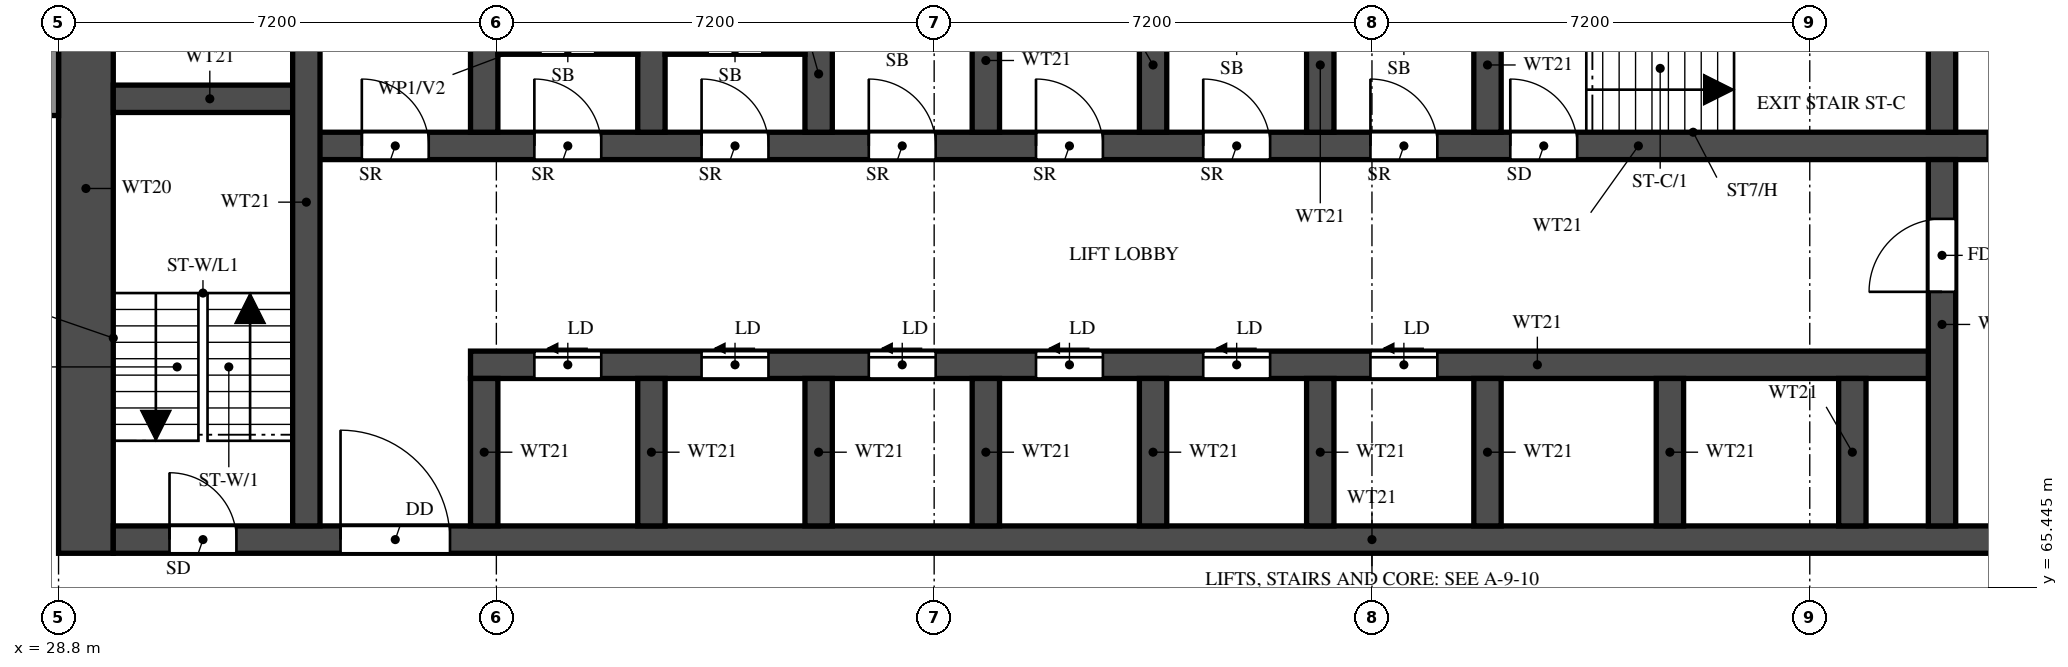
"""IFC4 building model, lengths in metres.
Left out: names, types, materials, properties, quantities, classifications, styles, units other than length and angle.
Written with IfcOpenShell. Run it as: python <this file> out.ifc"""

import sys

from ifc_helpers import new_model, si_unit, direction, frame, frame_2d, origin, place, context, subcontext, project, spatial, rectangle, extrude, element, fill, save


model = new_model("IFC4")
c1 = context("Model", 3, precision=1e-05, world=origin(), true_north=direction((0.0, 1.0)))
c2 = subcontext(c1, "Body", "Model", "MODEL_VIEW")
j1 = project(units=[si_unit("LENGTHUNIT", "METRE"), si_unit("PLANEANGLEUNIT", "RADIAN")], contexts=[c1])
p1 = place(None, origin())
s1 = spatial("IfcSite", under=j1, at=p1, CompositionType="ELEMENT")
p2 = place(p1, origin())
s2 = spatial("IfcBuilding", under=s1, at=p2, CompositionType="ELEMENT")
p3 = place(p2, frame((0.0, 0.0, 55.0)))
s3 = spatial("IfcBuildingStorey", under=s2, at=p3, CompositionType="ELEMENT", Elevation=55.0)
p4 = place(p3, frame((29.25, 66.0, 0.0), z_axis=(0.0, 0.0, 1.0), x_axis=(0.0, 1.0, 0.0)))
e1 = element("IfcWall", 1, at=p4, inside=s3, PredefinedType="SHEAR", context=c2, shape_type="SweptSolid", body=[
    extrude(rectangle(XDim=12.0, YDim=0.9, at=frame_2d((6.0, 0.0))), origin(), (0.0, 0.0, 1.0), 3.18),
])
p5 = place(p3, frame((29.7, 66.225, 0.0), z_axis=(0.0, 0.0, 1.0), x_axis=(1.0, 0.0, 0.0)))
e2 = element("IfcWall", 2, at=p5, inside=s3, PredefinedType="SHEAR", context=c2, shape_type="SweptSolid", body=[
    extrude(rectangle(XDim=41.4, YDim=0.45, at=frame_2d((20.7, 0.0))), origin(), (0.0, 0.0, 1.0), 3.18),
])
p6 = place(p5, frame((0.925, 0.0, 0.0)))
e3 = element("IfcOpeningElement", 3, at=p6, cuts=e2, PredefinedType="OPENING", context=c2, shape_type="SweptSolid", body=[
    extrude(rectangle(XDim=1.1, YDim=2.1, at=frame_2d((0.55, 1.05))), frame((0.0, 0.235, 0.0), z_axis=(0.0, -1.0, 0.0), x_axis=(1.0, 0.0, 0.0)), (0.0, 0.0, 1.0), 0.47),
])
p7 = place(p5, frame((3.738, 0.0, 0.0)))
e4 = element("IfcOpeningElement", 4, at=p7, cuts=e2, PredefinedType="OPENING", context=c2, shape_type="SweptSolid", body=[
    extrude(rectangle(XDim=1.8, YDim=2.1, at=frame_2d((0.9, 1.05))), frame((0.0, 0.235, 0.0), z_axis=(0.0, -1.0, 0.0), x_axis=(1.0, 0.0, 0.0)), (0.0, 0.0, 1.0), 0.47),
])
p8 = place(p3, frame((35.575, 69.1, 0.0), z_axis=(0.0, 0.0, 1.0), x_axis=(1.0, 0.0, 0.0)))
e5 = element("IfcWall", 5, at=p8, inside=s3, PredefinedType="SHEAR", context=c2, shape_type="SweptSolid", body=[
    extrude(rectangle(XDim=24.2, YDim=0.45, at=frame_2d((12.1, 0.0))), origin(), (0.0, 0.0, 1.0), 3.18),
])
p9 = place(p8, frame((1.05, 0.0, 0.0)))
e6 = element("IfcOpeningElement", 6, at=p9, cuts=e5, PredefinedType="OPENING", context=c2, shape_type="SweptSolid", body=[
    extrude(rectangle(XDim=1.1, YDim=2.1, at=frame_2d((0.55, 1.05))), frame((0.0, 0.235, 0.0), z_axis=(0.0, -1.0, 0.0), x_axis=(1.0, 0.0, 0.0)), (0.0, 0.0, 1.0), 0.47),
])
p10 = place(p8, frame((3.8, 0.0, 0.0)))
e7 = element("IfcOpeningElement", 7, at=p10, cuts=e5, PredefinedType="OPENING", context=c2, shape_type="SweptSolid", body=[
    extrude(rectangle(XDim=1.1, YDim=2.1, at=frame_2d((0.55, 1.05))), frame((0.0, 0.235, 0.0), z_axis=(0.0, -1.0, 0.0), x_axis=(1.0, 0.0, 0.0)), (0.0, 0.0, 1.0), 0.47),
])
p11 = place(p8, frame((6.55, 0.0, 0.0)))
e8 = element("IfcOpeningElement", 8, at=p11, cuts=e5, PredefinedType="OPENING", context=c2, shape_type="SweptSolid", body=[
    extrude(rectangle(XDim=1.1, YDim=2.1, at=frame_2d((0.55, 1.05))), frame((0.0, 0.235, 0.0), z_axis=(0.0, -1.0, 0.0), x_axis=(1.0, 0.0, 0.0)), (0.0, 0.0, 1.0), 0.47),
])
p12 = place(p8, frame((9.3, 0.0, 0.0)))
e9 = element("IfcOpeningElement", 9, at=p12, cuts=e5, PredefinedType="OPENING", context=c2, shape_type="SweptSolid", body=[
    extrude(rectangle(XDim=1.1, YDim=2.1, at=frame_2d((0.55, 1.05))), frame((0.0, 0.235, 0.0), z_axis=(0.0, -1.0, 0.0), x_axis=(1.0, 0.0, 0.0)), (0.0, 0.0, 1.0), 0.47),
])
p13 = place(p8, frame((12.05, 0.0, 0.0)))
e10 = element("IfcOpeningElement", 10, at=p13, cuts=e5, PredefinedType="OPENING", context=c2, shape_type="SweptSolid", body=[
    extrude(rectangle(XDim=1.1, YDim=2.1, at=frame_2d((0.55, 1.05))), frame((0.0, 0.235, 0.0), z_axis=(0.0, -1.0, 0.0), x_axis=(1.0, 0.0, 0.0)), (0.0, 0.0, 1.0), 0.47),
])
p14 = place(p8, frame((14.8, 0.0, 0.0)))
e11 = element("IfcOpeningElement", 11, at=p14, cuts=e5, PredefinedType="OPENING", context=c2, shape_type="SweptSolid", body=[
    extrude(rectangle(XDim=1.1, YDim=2.1, at=frame_2d((0.55, 1.05))), frame((0.0, 0.235, 0.0), z_axis=(0.0, -1.0, 0.0), x_axis=(1.0, 0.0, 0.0)), (0.0, 0.0, 1.0), 0.47),
])
p15 = place(p3, frame((32.875, 72.7, 0.0), z_axis=(0.0, 0.0, 1.0), x_axis=(1.0, 0.0, 0.0)))
e12 = element("IfcWall", 12, at=p15, inside=s3, PredefinedType="SHEAR", context=c2, shape_type="SweptSolid", body=[
    extrude(rectangle(XDim=35.05, YDim=0.45, at=frame_2d((17.525, 0.0))), origin(), (0.0, 0.0, 1.0), 3.18),
])
p16 = place(p15, frame((19.8, 0.0, 0.0)))
e13 = element("IfcOpeningElement", 13, at=p16, cuts=e12, PredefinedType="OPENING", context=c2, shape_type="SweptSolid", body=[
    extrude(rectangle(XDim=1.1, YDim=2.1, at=frame_2d((0.55, 1.05))), frame((0.0, 0.235, 0.0), z_axis=(0.0, -1.0, 0.0), x_axis=(1.0, 0.0, 0.0)), (0.0, 0.0, 1.0), 0.47),
])
p17 = place(p15, frame((27.65, 0.0, 0.0)))
e14 = element("IfcOpeningElement", 14, at=p17, cuts=e12, PredefinedType="OPENING", context=c2, shape_type="SweptSolid", body=[
    extrude(rectangle(XDim=1.1, YDim=2.1, at=frame_2d((0.55, 1.05))), frame((0.0, 0.235, 0.0), z_axis=(0.0, -1.0, 0.0), x_axis=(1.0, 0.0, 0.0)), (0.0, 0.0, 1.0), 0.47),
])
p18 = place(p15, frame((30.25, 0.0, 0.0)))
e15 = element("IfcOpeningElement", 15, at=p18, cuts=e12, PredefinedType="OPENING", context=c2, shape_type="SweptSolid", body=[
    extrude(rectangle(XDim=1.1, YDim=2.1, at=frame_2d((0.55, 1.05))), frame((0.0, 0.235, 0.0), z_axis=(0.0, -1.0, 0.0), x_axis=(1.0, 0.0, 0.0)), (0.0, 0.0, 1.0), 0.47),
])
p19 = place(p15, frame((3.75, 0.0, 0.0)))
e16 = element("IfcOpeningElement", 16, at=p19, cuts=e12, PredefinedType="OPENING", context=c2, shape_type="SweptSolid", body=[
    extrude(rectangle(XDim=1.1, YDim=2.1, at=frame_2d((0.55, 1.05))), frame((0.0, 0.235, 0.0), z_axis=(0.0, -1.0, 0.0), x_axis=(1.0, 0.0, 0.0)), (0.0, 0.0, 1.0), 0.47),
])
p20 = place(p15, frame((6.5, 0.0, 0.0)))
e17 = element("IfcOpeningElement", 17, at=p20, cuts=e12, PredefinedType="OPENING", context=c2, shape_type="SweptSolid", body=[
    extrude(rectangle(XDim=1.1, YDim=2.1, at=frame_2d((0.55, 1.05))), frame((0.0, 0.235, 0.0), z_axis=(0.0, -1.0, 0.0), x_axis=(1.0, 0.0, 0.0)), (0.0, 0.0, 1.0), 0.47),
])
p21 = place(p15, frame((9.25, 0.0, 0.0)))
e18 = element("IfcOpeningElement", 18, at=p21, cuts=e12, PredefinedType="OPENING", context=c2, shape_type="SweptSolid", body=[
    extrude(rectangle(XDim=1.1, YDim=2.1, at=frame_2d((0.55, 1.05))), frame((0.0, 0.235, 0.0), z_axis=(0.0, -1.0, 0.0), x_axis=(1.0, 0.0, 0.0)), (0.0, 0.0, 1.0), 0.47),
])
p22 = place(p15, frame((12.0, 0.0, 0.0)))
e19 = element("IfcOpeningElement", 19, at=p22, cuts=e12, PredefinedType="OPENING", context=c2, shape_type="SweptSolid", body=[
    extrude(rectangle(XDim=1.1, YDim=2.1, at=frame_2d((0.55, 1.05))), frame((0.0, 0.235, 0.0), z_axis=(0.0, -1.0, 0.0), x_axis=(1.0, 0.0, 0.0)), (0.0, 0.0, 1.0), 0.47),
])
p23 = place(p15, frame((14.75, 0.0, 0.0)))
e20 = element("IfcOpeningElement", 20, at=p23, cuts=e12, PredefinedType="OPENING", context=c2, shape_type="SweptSolid", body=[
    extrude(rectangle(XDim=1.1, YDim=2.1, at=frame_2d((0.55, 1.05))), frame((0.0, 0.235, 0.0), z_axis=(0.0, -1.0, 0.0), x_axis=(1.0, 0.0, 0.0)), (0.0, 0.0, 1.0), 0.47),
])
p24 = place(p15, frame((17.5, 0.0, 0.0)))
e21 = element("IfcOpeningElement", 21, at=p24, cuts=e12, PredefinedType="OPENING", context=c2, shape_type="SweptSolid", body=[
    extrude(rectangle(XDim=1.1, YDim=2.1, at=frame_2d((0.55, 1.05))), frame((0.0, 0.235, 0.0), z_axis=(0.0, -1.0, 0.0), x_axis=(1.0, 0.0, 0.0)), (0.0, 0.0, 1.0), 0.47),
])
p25 = place(p15, frame((0.913, 0.0, 0.0)))
e22 = element("IfcOpeningElement", 22, at=p25, cuts=e12, PredefinedType="OPENING", context=c2, shape_type="SweptSolid", body=[
    extrude(rectangle(XDim=1.1, YDim=2.1, at=frame_2d((0.55, 1.05))), frame((0.0, 0.235, 0.0), z_axis=(0.0, -1.0, 0.0), x_axis=(1.0, 0.0, 0.0)), (0.0, 0.0, 1.0), 0.47),
])
p26 = place(p3, frame((29.7, 73.475, 0.0), z_axis=(0.0, 0.0, 1.0), x_axis=(1.0, 0.0, 0.0)))
e23 = element("IfcWall", 23, at=p26, inside=s3, PredefinedType="SHEAR", context=c2, shape_type="SweptSolid", body=[
    extrude(rectangle(XDim=3.175, YDim=0.45, at=frame_2d((1.587, 0.0))), origin(), (0.0, 0.0, 1.0), 3.18),
])
p27 = place(p3, frame((32.875, 66.45, 0.0), z_axis=(0.0, 0.0, 1.0), x_axis=(0.0, 1.0, 0.0)))
e24 = element("IfcWall", 24, at=p27, inside=s3, PredefinedType="SHEAR", context=c2, shape_type="SweptSolid", body=[
    extrude(rectangle(XDim=10.65, YDim=0.45, at=frame_2d((5.325, 0.0))), origin(), (0.0, 0.0, 1.0), 3.18),
])
p28 = place(p3, frame((59.775, 66.45, 0.0), z_axis=(0.0, 0.0, 1.0), x_axis=(0.0, 1.0, 0.0)))
e25 = element("IfcWall", 25, at=p28, inside=s3, PredefinedType="SHEAR", context=c2, shape_type="SweptSolid", body=[
    extrude(rectangle(XDim=6.025, YDim=0.45, at=frame_2d((3.013, 0.0))), origin(), (0.0, 0.0, 1.0), 3.18),
])
p29 = place(p28, frame((3.85, 0.0, 0.0)))
e26 = element("IfcOpeningElement", 26, at=p29, cuts=e25, PredefinedType="OPENING", context=c2, shape_type="SweptSolid", body=[
    extrude(rectangle(XDim=1.2, YDim=2.1, at=frame_2d((0.6, 1.05))), frame((0.0, 0.235, 0.0), z_axis=(0.0, -1.0, 0.0), x_axis=(1.0, 0.0, 0.0)), (0.0, 0.0, 1.0), 0.47),
])
p30 = place(p3, frame((59.775, 72.925, 0.0), z_axis=(0.0, 0.0, 1.0), x_axis=(0.0, 1.0, 0.0)))
e27 = element("IfcWall", 27, at=p30, inside=s3, PredefinedType="SHEAR", context=c2, shape_type="SweptSolid", body=[
    extrude(rectangle(XDim=2.95, YDim=0.45, at=frame_2d((1.475, 0.0))), origin(), (0.0, 0.0, 1.0), 3.18),
])
for number, where, z_axis, x_axis in (
    (28, (35.8, 66.45, 0.0), (0.0, 0.0, 1.0), (0.0, 1.0, 0.0)),
    (29, (38.55, 66.45, 0.0), (0.0, 0.0, 1.0), (0.0, 1.0, 0.0)),
    (30, (41.3, 66.45, 0.0), (0.0, 0.0, 1.0), (0.0, 1.0, 0.0)),
    (31, (44.05, 66.45, 0.0), (0.0, 0.0, 1.0), (0.0, 1.0, 0.0)),
    (32, (46.8, 66.45, 0.0), (0.0, 0.0, 1.0), (0.0, 1.0, 0.0)),
    (33, (49.55, 66.45, 0.0), (0.0, 0.0, 1.0), (0.0, 1.0, 0.0)),
    (34, (52.3, 66.45, 0.0), (0.0, 0.0, 1.0), (0.0, 1.0, 0.0)),
    (35, (55.3, 66.45, 0.0), (0.0, 0.0, 1.0), (0.0, 1.0, 0.0)),
    (36, (58.3, 66.45, 0.0), (0.0, 0.0, 1.0), (0.0, 1.0, 0.0)),
):
    element("IfcWall", number, at=place(p3, frame(where, z_axis=z_axis, x_axis=x_axis)), inside=s3, PredefinedType="SHEAR", context=c2, shape_type="SweptSolid", body=[
        extrude(rectangle(XDim=2.425, YDim=0.45, at=frame_2d((1.212, 0.0))), origin(), (0.0, 0.0, 1.0), 3.18),
    ])
for number, where, z_axis, x_axis in (
    (37, (35.8, 72.925, 0.0), (0.0, 0.0, 1.0), (0.0, 1.0, 0.0)),
    (38, (38.55, 72.925, 0.0), (0.0, 0.0, 1.0), (0.0, 1.0, 0.0)),
    (39, (41.3, 72.925, 0.0), (0.0, 0.0, 1.0), (0.0, 1.0, 0.0)),
    (40, (44.05, 72.925, 0.0), (0.0, 0.0, 1.0), (0.0, 1.0, 0.0)),
    (41, (46.8, 72.925, 0.0), (0.0, 0.0, 1.0), (0.0, 1.0, 0.0)),
    (42, (49.55, 72.925, 0.0), (0.0, 0.0, 1.0), (0.0, 1.0, 0.0)),
    (43, (52.3, 72.925, 0.0), (0.0, 0.0, 1.0), (0.0, 1.0, 0.0)),
):
    element("IfcWall", number, at=place(p3, frame(where, z_axis=z_axis, x_axis=x_axis)), inside=s3, PredefinedType="SHEAR", context=c2, shape_type="SweptSolid", body=[
        extrude(rectangle(XDim=2.95, YDim=0.45, at=frame_2d((1.475, 0.0))), origin(), (0.0, 0.0, 1.0), 3.18),
    ])
p31 = place(p3, frame((36.025, 74.282, 0.0), z_axis=(0.0, 0.0, 1.0), x_axis=(1.0, 0.0, 0.0)))
e44 = element("IfcWall", 44, at=p31, inside=s3, PredefinedType="PARTITIONING", context=c2, shape_type="SweptSolid", body=[
    extrude(rectangle(XDim=2.3, YDim=0.15, at=frame_2d((1.15, 0.0))), origin(), (0.0, 0.0, 1.0), 3.18),
])
p32 = place(p31, frame((0.7, 0.0, 0.0)))
e45 = element("IfcOpeningElement", 45, at=p32, cuts=e44, PredefinedType="OPENING", context=c2, shape_type="SweptSolid", body=[
    extrude(rectangle(XDim=0.9, YDim=2.1, at=frame_2d((0.45, 1.05))), frame((0.0, 0.085, 0.0), z_axis=(0.0, -1.0, 0.0), x_axis=(1.0, 0.0, 0.0)), (0.0, 0.0, 1.0), 0.17),
])
p33 = place(p3, frame((38.775, 74.282, 0.0), z_axis=(0.0, 0.0, 1.0), x_axis=(1.0, 0.0, 0.0)))
e46 = element("IfcWall", 46, at=p33, inside=s3, PredefinedType="PARTITIONING", context=c2, shape_type="SweptSolid", body=[
    extrude(rectangle(XDim=2.3, YDim=0.15, at=frame_2d((1.15, 0.0))), origin(), (0.0, 0.0, 1.0), 3.18),
])
p34 = place(p33, frame((0.7, 0.0, 0.0)))
e47 = element("IfcOpeningElement", 47, at=p34, cuts=e46, PredefinedType="OPENING", context=c2, shape_type="SweptSolid", body=[
    extrude(rectangle(XDim=0.9, YDim=2.1, at=frame_2d((0.45, 1.05))), frame((0.0, 0.085, 0.0), z_axis=(0.0, -1.0, 0.0), x_axis=(1.0, 0.0, 0.0)), (0.0, 0.0, 1.0), 0.17),
])
p35 = place(p3, frame((28.7, 73.2, 0.0), z_axis=(0.0, 0.0, 1.0), x_axis=(0.0, 1.0, 0.0)))
e48 = element("IfcWall", 48, at=p35, inside=s3, PredefinedType="SOLIDWALL", context=c2, shape_type="SweptSolid", body=[
    extrude(rectangle(XDim=4.8, YDim=0.2, at=frame_2d((2.4, 0.0))), origin(), (0.0, 0.0, 1.0), 3.18),
])
p36 = place(p6, origin())
e49 = element("IfcDoor", 49, at=p36, inside=s3, OperationType="SINGLE_SWING_LEFT", PredefinedType="DOOR", context=c2, shape_type="SweptSolid", body=[
    extrude(rectangle(XDim=1.1, YDim=2.1, at=frame_2d((0.55, 1.05))), frame((0.0, 0.025, 0.0), z_axis=(0.0, -1.0, 0.0), x_axis=(1.0, 0.0, 0.0)), (0.0, 0.0, 1.0), 0.05),
])
fill(e3, e49)
p37 = place(p16, origin())
e50 = element("IfcDoor", 50, at=p37, inside=s3, OperationType="SINGLE_SWING_LEFT", PredefinedType="DOOR", context=c2, shape_type="SweptSolid", body=[
    extrude(rectangle(XDim=1.1, YDim=2.1, at=frame_2d((0.55, 1.05))), frame((0.0, 0.025, 0.0), z_axis=(0.0, -1.0, 0.0), x_axis=(1.0, 0.0, 0.0)), (0.0, 0.0, 1.0), 0.05),
])
fill(e13, e50)
p38 = place(p7, origin())
e51 = element("IfcDoor", 51, at=p38, inside=s3, OperationType="DOUBLE_DOOR_SINGLE_SWING", PredefinedType="DOOR", context=c2, shape_type="SweptSolid", body=[
    extrude(rectangle(XDim=1.8, YDim=2.1, at=frame_2d((0.9, 1.05))), frame((0.0, 0.025, 0.0), z_axis=(0.0, -1.0, 0.0), x_axis=(1.0, 0.0, 0.0)), (0.0, 0.0, 1.0), 0.05),
])
fill(e4, e51)
p39 = place(p29, origin())
e52 = element("IfcDoor", 52, at=p39, inside=s3, OperationType="SINGLE_SWING_RIGHT", PredefinedType="DOOR", context=c2, shape_type="SweptSolid", body=[
    extrude(rectangle(XDim=1.2, YDim=2.1, at=frame_2d((0.6, 1.05))), frame((0.0, 0.025, 0.0), z_axis=(0.0, -1.0, 0.0), x_axis=(1.0, 0.0, 0.0)), (0.0, 0.0, 1.0), 0.05),
])
fill(e26, e52)
p40 = place(p17, origin())
e53 = element("IfcDoor", 53, at=p40, inside=s3, OperationType="SLIDING_TO_LEFT", PredefinedType="DOOR", context=c2, shape_type="SweptSolid", body=[
    extrude(rectangle(XDim=1.1, YDim=2.1, at=frame_2d((0.55, 1.05))), frame((0.0, 0.025, 0.0), z_axis=(0.0, -1.0, 0.0), x_axis=(1.0, 0.0, 0.0)), (0.0, 0.0, 1.0), 0.05),
])
fill(e14, e53)
p41 = place(p9, origin())
e54 = element("IfcDoor", 54, at=p41, inside=s3, OperationType="SLIDING_TO_LEFT", PredefinedType="DOOR", context=c2, shape_type="SweptSolid", body=[
    extrude(rectangle(XDim=1.1, YDim=2.1, at=frame_2d((0.55, 1.05))), frame((0.0, 0.025, 0.0), z_axis=(0.0, -1.0, 0.0), x_axis=(1.0, 0.0, 0.0)), (0.0, 0.0, 1.0), 0.05),
])
fill(e6, e54)
p42 = place(p10, origin())
e55 = element("IfcDoor", 55, at=p42, inside=s3, OperationType="SLIDING_TO_LEFT", PredefinedType="DOOR", context=c2, shape_type="SweptSolid", body=[
    extrude(rectangle(XDim=1.1, YDim=2.1, at=frame_2d((0.55, 1.05))), frame((0.0, 0.025, 0.0), z_axis=(0.0, -1.0, 0.0), x_axis=(1.0, 0.0, 0.0)), (0.0, 0.0, 1.0), 0.05),
])
fill(e7, e55)
p43 = place(p11, origin())
e56 = element("IfcDoor", 56, at=p43, inside=s3, OperationType="SLIDING_TO_LEFT", PredefinedType="DOOR", context=c2, shape_type="SweptSolid", body=[
    extrude(rectangle(XDim=1.1, YDim=2.1, at=frame_2d((0.55, 1.05))), frame((0.0, 0.025, 0.0), z_axis=(0.0, -1.0, 0.0), x_axis=(1.0, 0.0, 0.0)), (0.0, 0.0, 1.0), 0.05),
])
fill(e8, e56)
p44 = place(p12, origin())
e57 = element("IfcDoor", 57, at=p44, inside=s3, OperationType="SLIDING_TO_LEFT", PredefinedType="DOOR", context=c2, shape_type="SweptSolid", body=[
    extrude(rectangle(XDim=1.1, YDim=2.1, at=frame_2d((0.55, 1.05))), frame((0.0, 0.025, 0.0), z_axis=(0.0, -1.0, 0.0), x_axis=(1.0, 0.0, 0.0)), (0.0, 0.0, 1.0), 0.05),
])
fill(e9, e57)
p45 = place(p13, origin())
e58 = element("IfcDoor", 58, at=p45, inside=s3, OperationType="SLIDING_TO_LEFT", PredefinedType="DOOR", context=c2, shape_type="SweptSolid", body=[
    extrude(rectangle(XDim=1.1, YDim=2.1, at=frame_2d((0.55, 1.05))), frame((0.0, 0.025, 0.0), z_axis=(0.0, -1.0, 0.0), x_axis=(1.0, 0.0, 0.0)), (0.0, 0.0, 1.0), 0.05),
])
fill(e10, e58)
p46 = place(p14, origin())
e59 = element("IfcDoor", 59, at=p46, inside=s3, OperationType="SLIDING_TO_LEFT", PredefinedType="DOOR", context=c2, shape_type="SweptSolid", body=[
    extrude(rectangle(XDim=1.1, YDim=2.1, at=frame_2d((0.55, 1.05))), frame((0.0, 0.025, 0.0), z_axis=(0.0, -1.0, 0.0), x_axis=(1.0, 0.0, 0.0)), (0.0, 0.0, 1.0), 0.05),
])
fill(e11, e59)
p47 = place(p19, origin())
e60 = element("IfcDoor", 60, at=p47, inside=s3, OperationType="SINGLE_SWING_LEFT", PredefinedType="DOOR", context=c2, shape_type="SweptSolid", body=[
    extrude(rectangle(XDim=1.1, YDim=2.1, at=frame_2d((0.55, 1.05))), frame((0.0, 0.025, 0.0), z_axis=(0.0, -1.0, 0.0), x_axis=(1.0, 0.0, 0.0)), (0.0, 0.0, 1.0), 0.05),
])
fill(e16, e60)
p48 = place(p20, origin())
e61 = element("IfcDoor", 61, at=p48, inside=s3, OperationType="SINGLE_SWING_LEFT", PredefinedType="DOOR", context=c2, shape_type="SweptSolid", body=[
    extrude(rectangle(XDim=1.1, YDim=2.1, at=frame_2d((0.55, 1.05))), frame((0.0, 0.025, 0.0), z_axis=(0.0, -1.0, 0.0), x_axis=(1.0, 0.0, 0.0)), (0.0, 0.0, 1.0), 0.05),
])
fill(e17, e61)
p49 = place(p21, origin())
e62 = element("IfcDoor", 62, at=p49, inside=s3, OperationType="SINGLE_SWING_LEFT", PredefinedType="DOOR", context=c2, shape_type="SweptSolid", body=[
    extrude(rectangle(XDim=1.1, YDim=2.1, at=frame_2d((0.55, 1.05))), frame((0.0, 0.025, 0.0), z_axis=(0.0, -1.0, 0.0), x_axis=(1.0, 0.0, 0.0)), (0.0, 0.0, 1.0), 0.05),
])
fill(e18, e62)
p50 = place(p22, origin())
e63 = element("IfcDoor", 63, at=p50, inside=s3, OperationType="SINGLE_SWING_LEFT", PredefinedType="DOOR", context=c2, shape_type="SweptSolid", body=[
    extrude(rectangle(XDim=1.1, YDim=2.1, at=frame_2d((0.55, 1.05))), frame((0.0, 0.025, 0.0), z_axis=(0.0, -1.0, 0.0), x_axis=(1.0, 0.0, 0.0)), (0.0, 0.0, 1.0), 0.05),
])
fill(e19, e63)
p51 = place(p23, origin())
e64 = element("IfcDoor", 64, at=p51, inside=s3, OperationType="SINGLE_SWING_LEFT", PredefinedType="DOOR", context=c2, shape_type="SweptSolid", body=[
    extrude(rectangle(XDim=1.1, YDim=2.1, at=frame_2d((0.55, 1.05))), frame((0.0, 0.025, 0.0), z_axis=(0.0, -1.0, 0.0), x_axis=(1.0, 0.0, 0.0)), (0.0, 0.0, 1.0), 0.05),
])
fill(e20, e64)
p52 = place(p24, origin())
e65 = element("IfcDoor", 65, at=p52, inside=s3, OperationType="SINGLE_SWING_LEFT", PredefinedType="DOOR", context=c2, shape_type="SweptSolid", body=[
    extrude(rectangle(XDim=1.1, YDim=2.1, at=frame_2d((0.55, 1.05))), frame((0.0, 0.025, 0.0), z_axis=(0.0, -1.0, 0.0), x_axis=(1.0, 0.0, 0.0)), (0.0, 0.0, 1.0), 0.05),
])
fill(e21, e65)
p53 = place(p25, origin())
e66 = element("IfcDoor", 66, at=p53, inside=s3, OperationType="SINGLE_SWING_LEFT", PredefinedType="DOOR", context=c2, shape_type="SweptSolid", body=[
    extrude(rectangle(XDim=1.1, YDim=2.1, at=frame_2d((0.55, 1.05))), frame((0.0, 0.025, 0.0), z_axis=(0.0, -1.0, 0.0), x_axis=(1.0, 0.0, 0.0)), (0.0, 0.0, 1.0), 0.05),
])
fill(e22, e66)
save(model, sys.argv[1])
